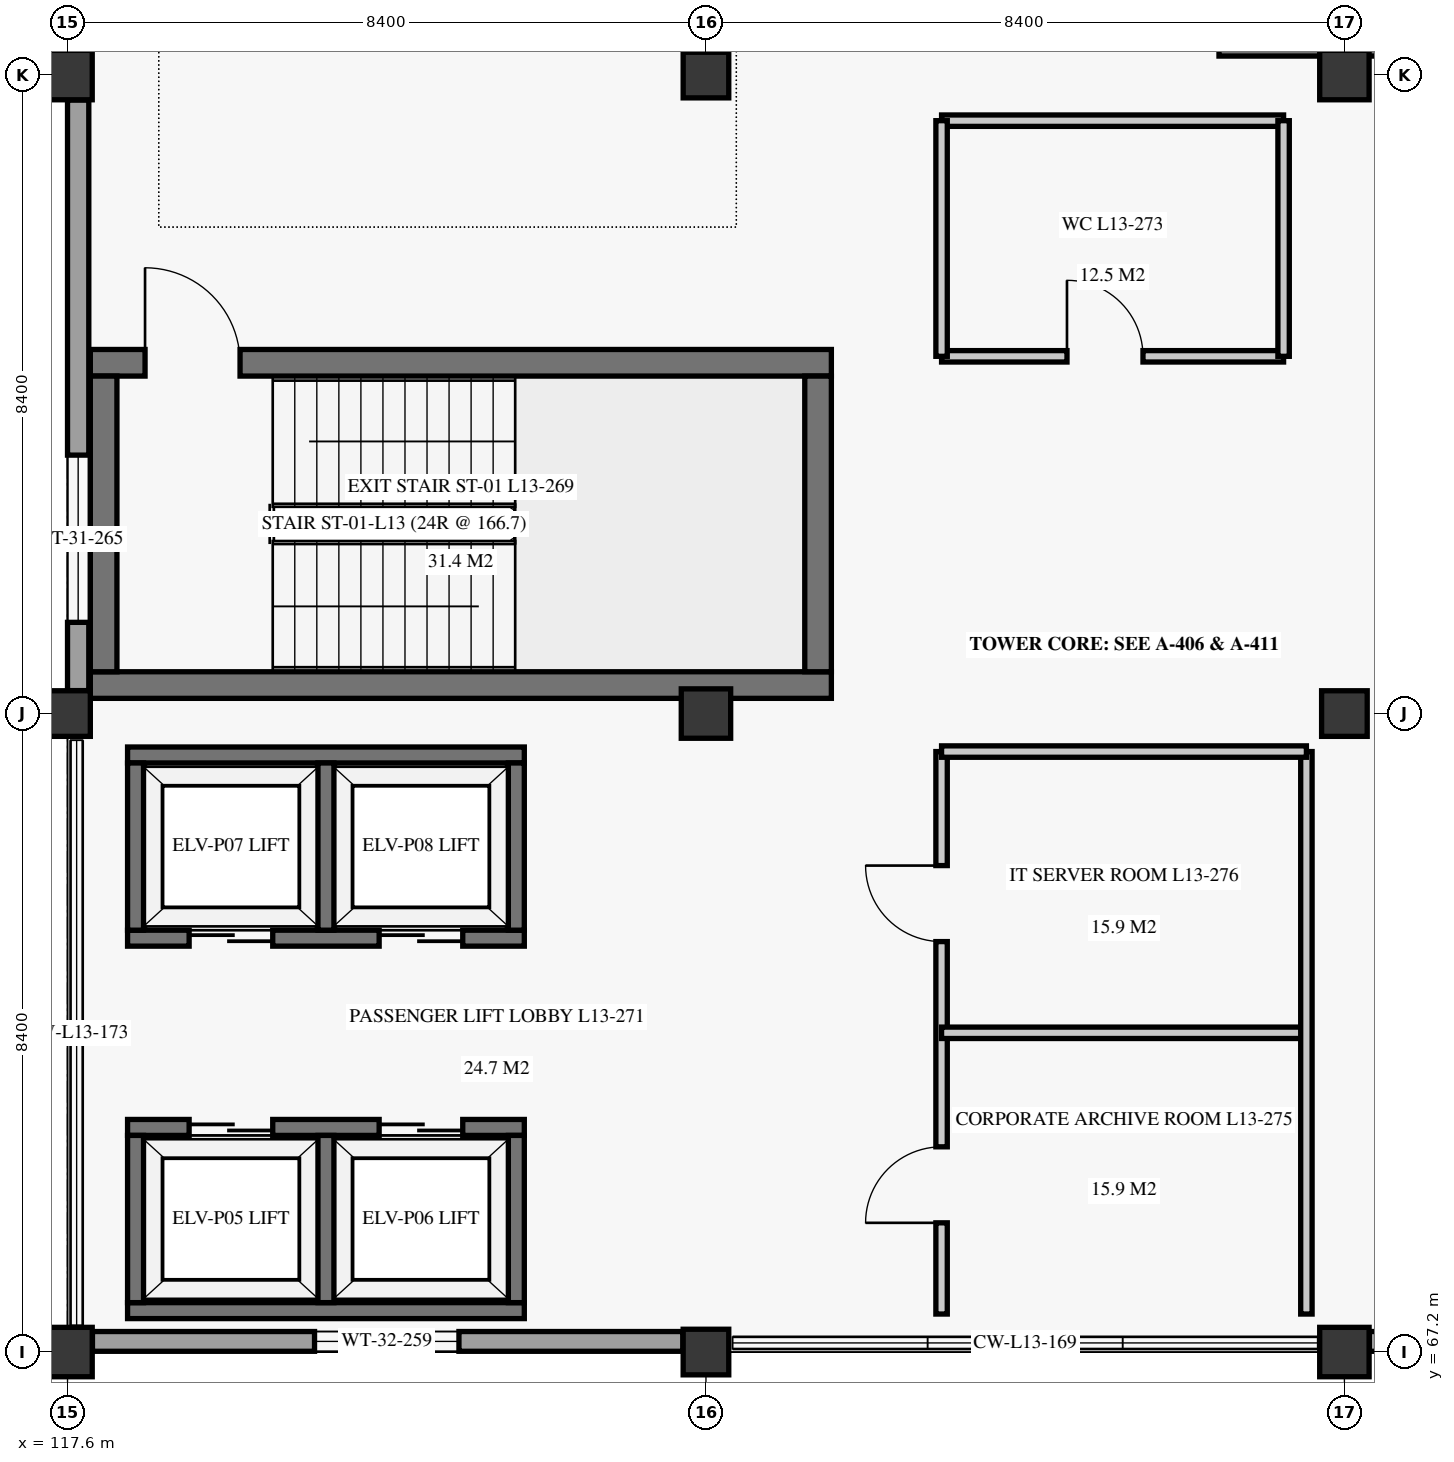
"""IFC4 building model, lengths in metres.
Left out: names, types, materials, properties, quantities, classifications, styles, units other than length and angle.
Written with IfcOpenShell. Run it as: python <this file> out.ifc"""

import sys

from ifc_helpers import new_model, si_unit, direction, frame, frame_2d, origin, origin_2d, place, context, subcontext, project, spatial, rectangle, extrude, element, fill, save


model = new_model("IFC4")
c1 = context("Model", 3, precision=1e-05, world=origin(), true_north=direction((0.0, 1.0)))
c2 = subcontext(c1, "Body", "Model", "MODEL_VIEW")
j1 = project(units=[si_unit("LENGTHUNIT", "METRE"), si_unit("PLANEANGLEUNIT", "RADIAN")], contexts=[c1])
p1 = place(None, origin())
s1 = spatial("IfcSite", under=j1, at=p1, CompositionType="ELEMENT")
p2 = place(p1, origin())
s2 = spatial("IfcBuilding", under=s1, at=p2, CompositionType="ELEMENT")
p3 = place(p2, frame((0.0, 0.0, 54.7)))
s3 = spatial("IfcBuildingStorey", under=s2, at=p3, CompositionType="ELEMENT", Elevation=54.7)
p4 = place(p3, frame((117.6, 67.2, 0.0), z_axis=(0.0, 0.0, 1.0), x_axis=(1.0, 0.0, 0.0)))
e1 = element("IfcColumn", 1, at=p4, inside=s3, PredefinedType="COLUMN", context=c2, shape_type="SweptSolid", body=[
    extrude(rectangle(XDim=0.65, YDim=0.65, at=origin_2d()), origin(), (0.0, 0.0, 1.0), 3.72),
])
p5 = place(p3, frame((117.6, 75.6, 0.0), z_axis=(0.0, 0.0, 1.0), x_axis=(1.0, 0.0, 0.0)))
e2 = element("IfcColumn", 2, at=p5, inside=s3, PredefinedType="COLUMN", context=c2, shape_type="SweptSolid", body=[
    extrude(rectangle(XDim=0.6, YDim=0.6, at=origin_2d()), origin(), (0.0, 0.0, 1.0), 3.72),
])
p6 = place(p3, frame((117.6, 84.0, 0.0), z_axis=(0.0, 0.0, 1.0), x_axis=(1.0, 0.0, 0.0)))
e3 = element("IfcColumn", 3, at=p6, inside=s3, PredefinedType="COLUMN", context=c2, shape_type="SweptSolid", body=[
    extrude(rectangle(XDim=0.65, YDim=0.65, at=origin_2d()), origin(), (0.0, 0.0, 1.0), 3.72),
])
p7 = place(p3, frame((126.0, 67.2, 0.0), z_axis=(0.0, 0.0, 1.0), x_axis=(1.0, 0.0, 0.0)))
e4 = element("IfcColumn", 4, at=p7, inside=s3, PredefinedType="COLUMN", context=c2, shape_type="SweptSolid", body=[
    extrude(rectangle(XDim=0.6, YDim=0.6, at=origin_2d()), origin(), (0.0, 0.0, 1.0), 3.72),
])
p8 = place(p3, frame((126.0, 75.6, 0.0), z_axis=(0.0, 0.0, 1.0), x_axis=(1.0, 0.0, 0.0)))
e5 = element("IfcColumn", 5, at=p8, inside=s3, PredefinedType="COLUMN", context=c2, shape_type="SweptSolid", body=[
    extrude(rectangle(XDim=0.65, YDim=0.65, at=origin_2d()), origin(), (0.0, 0.0, 1.0), 3.72),
])
p9 = place(p3, frame((126.0, 84.0, 0.0), z_axis=(0.0, 0.0, 1.0), x_axis=(1.0, 0.0, 0.0)))
e6 = element("IfcColumn", 6, at=p9, inside=s3, PredefinedType="COLUMN", context=c2, shape_type="SweptSolid", body=[
    extrude(rectangle(XDim=0.6, YDim=0.6, at=origin_2d()), origin(), (0.0, 0.0, 1.0), 3.72),
])
p10 = place(p3, frame((134.4, 67.2, 0.0), z_axis=(0.0, 0.0, 1.0), x_axis=(1.0, 0.0, 0.0)))
e7 = element("IfcColumn", 7, at=p10, inside=s3, PredefinedType="COLUMN", context=c2, shape_type="SweptSolid", body=[
    extrude(rectangle(XDim=0.65, YDim=0.65, at=origin_2d()), origin(), (0.0, 0.0, 1.0), 3.72),
])
p11 = place(p3, frame((134.4, 75.6, 0.0), z_axis=(0.0, 0.0, 1.0), x_axis=(1.0, 0.0, 0.0)))
e8 = element("IfcColumn", 8, at=p11, inside=s3, PredefinedType="COLUMN", context=c2, shape_type="SweptSolid", body=[
    extrude(rectangle(XDim=0.6, YDim=0.6, at=origin_2d()), origin(), (0.0, 0.0, 1.0), 3.72),
])
p12 = place(p3, frame((134.4, 84.0, 0.0), z_axis=(0.0, 0.0, 1.0), x_axis=(1.0, 0.0, 0.0)))
e9 = element("IfcColumn", 9, at=p12, inside=s3, PredefinedType="COLUMN", context=c2, shape_type="SweptSolid", body=[
    extrude(rectangle(XDim=0.65, YDim=0.65, at=origin_2d()), origin(), (0.0, 0.0, 1.0), 3.72),
])
p13 = place(p3, frame((117.928, 67.34, 0.0), z_axis=(0.0, 0.0, 1.0), x_axis=(1.0, 0.0, 0.0)))
e10 = element("IfcWall", 10, at=p13, inside=s3, PredefinedType="SOLIDWALL", context=c2, shape_type="SweptSolid", body=[
    extrude(rectangle(XDim=7.768, YDim=0.26, at=frame_2d((3.884, 0.0))), origin(), (0.0, 0.0, 1.0), 3.04),
])
p14 = place(p13, frame((2.922, 0.0, 0.85)))
e11 = element("IfcOpeningElement", 11, at=p14, cuts=e10, PredefinedType="OPENING", context=c2, shape_type="SweptSolid", body=[
    extrude(rectangle(XDim=1.9, YDim=1.75, at=frame_2d((0.95, 0.875))), frame((0.0, 0.14, 0.0), z_axis=(0.0, -1.0, 0.0), x_axis=(1.0, 0.0, 0.0)), (0.0, 0.0, 1.0), 0.28),
])
p15 = place(p3, frame((134.728, 67.34, 0.0), z_axis=(0.0, 0.0, 1.0), x_axis=(1.0, 0.0, 0.0)))
e12 = element("IfcWall", 12, at=p15, inside=s3, PredefinedType="SOLIDWALL", context=c2, shape_type="SweptSolid", body=[
    extrude(rectangle(XDim=7.77, YDim=0.26, at=frame_2d((3.885, 0.0))), origin(), (0.0, 0.0, 1.0), 3.04),
])
p16 = place(p15, frame((2.322, 0.0, 0.85)))
e13 = element("IfcOpeningElement", 13, at=p16, cuts=e12, PredefinedType="OPENING", context=c2, shape_type="SweptSolid", body=[
    extrude(rectangle(XDim=3.1, YDim=1.85, at=frame_2d((1.55, 0.925))), frame((0.0, 0.14, 0.0), z_axis=(0.0, -1.0, 0.0), x_axis=(1.0, 0.0, 0.0)), (0.0, 0.0, 1.0), 0.28),
])
p17 = place(p3, frame((117.74, 75.902, 0.0), z_axis=(0.0, 0.0, 1.0), x_axis=(0.0, 1.0, 0.0)))
e14 = element("IfcWall", 14, at=p17, inside=s3, PredefinedType="SOLIDWALL", context=c2, shape_type="SweptSolid", body=[
    extrude(rectangle(XDim=7.77, YDim=0.28, at=frame_2d((3.885, 0.0))), origin(), (0.0, 0.0, 1.0), 3.04),
])
p18 = place(p17, frame((0.898, 0.0, 0.85)))
e15 = element("IfcOpeningElement", 15, at=p18, cuts=e14, PredefinedType="OPENING", context=c2, shape_type="SweptSolid", body=[
    extrude(rectangle(XDim=2.2, YDim=1.8, at=frame_2d((1.1, 0.9))), frame((0.0, 0.15, 0.0), z_axis=(0.0, -1.0, 0.0), x_axis=(1.0, 0.0, 0.0)), (0.0, 0.0, 1.0), 0.3),
])
p19 = place(p3, frame((117.9, 75.975, 0.0), z_axis=(0.0, 0.0, 1.0), x_axis=(1.0, 0.0, 0.0)))
e16 = element("IfcWall", 16, at=p19, inside=s3, PredefinedType="SHEAR", context=c2, shape_type="SweptSolid", body=[
    extrude(rectangle(XDim=9.75, YDim=0.35, at=frame_2d((4.875, 0.0))), origin(), (0.0, 0.0, 1.0), 3.72),
])
p20 = place(p3, frame((117.9, 80.215, 0.0), z_axis=(0.0, 0.0, 1.0), x_axis=(1.0, 0.0, 0.0)))
e17 = element("IfcWall", 17, at=p20, inside=s3, PredefinedType="SHEAR", context=c2, shape_type="SweptSolid", body=[
    extrude(rectangle(XDim=9.75, YDim=0.35, at=frame_2d((4.875, 0.0))), origin(), (0.0, 0.0, 1.0), 3.72),
])
p21 = place(p20, frame((0.72, 0.0, 0.0)))
e18 = element("IfcOpeningElement", 18, at=p21, cuts=e17, PredefinedType="OPENING", context=c2, shape_type="SweptSolid", body=[
    extrude(rectangle(XDim=1.25, YDim=2.2, at=frame_2d((0.625, 1.1))), frame((0.0, 0.185, 0.0), z_axis=(0.0, -1.0, 0.0), x_axis=(1.0, 0.0, 0.0)), (0.0, 0.0, 1.0), 0.37),
])
for number, where, z_axis, x_axis in (
    (19, (118.075, 76.15, 0.0), (0.0, 0.0, 1.0), (0.0, 1.0, 0.0)),
    (20, (127.475, 76.15, 0.0), (0.0, 0.0, 1.0), (0.0, 1.0, 0.0)),
):
    element("IfcWall", number, at=place(p3, frame(where, z_axis=z_axis, x_axis=x_axis)), inside=s3, PredefinedType="SHEAR", context=c2, shape_type="SweptSolid", body=[
        extrude(rectangle(XDim=3.89, YDim=0.35, at=frame_2d((1.945, 0.0))), origin(), (0.0, 0.0, 1.0), 3.72),
    ])
p22 = place(p3, frame((132.75, 84.425, 0.0), z_axis=(0.0, 0.0, 1.0), x_axis=(1.0, 0.0, 0.0)))
e21 = element("IfcWall", 21, at=p22, inside=s3, PredefinedType="SHEAR", context=c2, shape_type="SweptSolid", body=[
    extrude(rectangle(XDim=9.75, YDim=0.35, at=frame_2d((4.875, 0.0))), origin(), (0.0, 0.0, 1.0), 3.72),
])
p23 = place(p3, frame((118.39, 67.745, 0.0), z_axis=(0.0, 0.0, 1.0), x_axis=(1.0, 0.0, 0.0)))
e22 = element("IfcWall", 22, at=p23, inside=s3, PredefinedType="SHEAR", context=c2, shape_type="SweptSolid", body=[
    extrude(rectangle(XDim=5.22, YDim=0.21, at=frame_2d((2.61, 0.0))), origin(), (0.0, 0.0, 1.0), 3.72),
])
p24 = place(p3, frame((118.39, 70.155, 0.0), z_axis=(0.0, 0.0, 1.0), x_axis=(1.0, 0.0, 0.0)))
e23 = element("IfcWall", 23, at=p24, inside=s3, PredefinedType="SHEAR", context=c2, shape_type="SweptSolid", body=[
    extrude(rectangle(XDim=5.22, YDim=0.21, at=frame_2d((2.61, 0.0))), origin(), (0.0, 0.0, 1.0), 3.72),
])
p25 = place(p24, frame((0.81, 0.0, 0.0)))
e24 = element("IfcOpeningElement", 24, at=p25, cuts=e23, PredefinedType="OPENING", context=c2, shape_type="SweptSolid", body=[
    extrude(rectangle(XDim=1.1, YDim=2.15, at=frame_2d((0.55, 1.075))), frame((0.0, 0.115, 0.0), z_axis=(0.0, -1.0, 0.0), x_axis=(1.0, 0.0, 0.0)), (0.0, 0.0, 1.0), 0.23),
])
p26 = place(p24, frame((3.31, 0.0, 0.0)))
e25 = element("IfcOpeningElement", 25, at=p26, cuts=e23, PredefinedType="OPENING", context=c2, shape_type="SweptSolid", body=[
    extrude(rectangle(XDim=1.1, YDim=2.15, at=frame_2d((0.55, 1.075))), frame((0.0, 0.115, 0.0), z_axis=(0.0, -1.0, 0.0), x_axis=(1.0, 0.0, 0.0)), (0.0, 0.0, 1.0), 0.23),
])
for number, where, z_axis, x_axis in (
    (26, (118.495, 67.85, 0.0), (0.0, 0.0, 1.0), (0.0, 1.0, 0.0)),
    (27, (123.505, 67.85, 0.0), (0.0, 0.0, 1.0), (0.0, 1.0, 0.0)),
    (28, (121.0, 67.85, 0.0), (0.0, 0.0, 1.0), (0.0, 1.0, 0.0)),
):
    element("IfcWall", number, at=place(p3, frame(where, z_axis=z_axis, x_axis=x_axis)), inside=s3, PredefinedType="SHEAR", context=c2, shape_type="SweptSolid", body=[
        extrude(rectangle(XDim=2.2, YDim=0.21, at=frame_2d((1.1, 0.0))), origin(), (0.0, 0.0, 1.0), 3.72),
    ])
p27 = place(p3, frame((118.39, 72.645, 0.0), z_axis=(0.0, 0.0, 1.0), x_axis=(1.0, 0.0, 0.0)))
e29 = element("IfcWall", 29, at=p27, inside=s3, PredefinedType="SHEAR", context=c2, shape_type="SweptSolid", body=[
    extrude(rectangle(XDim=5.22, YDim=0.21, at=frame_2d((2.61, 0.0))), origin(), (0.0, 0.0, 1.0), 3.72),
])
p28 = place(p27, frame((0.81, 0.0, 0.0)))
e30 = element("IfcOpeningElement", 30, at=p28, cuts=e29, PredefinedType="OPENING", context=c2, shape_type="SweptSolid", body=[
    extrude(rectangle(XDim=1.1, YDim=2.15, at=frame_2d((0.55, 1.075))), frame((0.0, 0.115, 0.0), z_axis=(0.0, -1.0, 0.0), x_axis=(1.0, 0.0, 0.0)), (0.0, 0.0, 1.0), 0.23),
])
p29 = place(p27, frame((3.31, 0.0, 0.0)))
e31 = element("IfcOpeningElement", 31, at=p29, cuts=e29, PredefinedType="OPENING", context=c2, shape_type="SweptSolid", body=[
    extrude(rectangle(XDim=1.1, YDim=2.15, at=frame_2d((0.55, 1.075))), frame((0.0, 0.115, 0.0), z_axis=(0.0, -1.0, 0.0), x_axis=(1.0, 0.0, 0.0)), (0.0, 0.0, 1.0), 0.23),
])
p30 = place(p3, frame((118.39, 75.055, 0.0), z_axis=(0.0, 0.0, 1.0), x_axis=(1.0, 0.0, 0.0)))
e32 = element("IfcWall", 32, at=p30, inside=s3, PredefinedType="SHEAR", context=c2, shape_type="SweptSolid", body=[
    extrude(rectangle(XDim=5.22, YDim=0.21, at=frame_2d((2.61, 0.0))), origin(), (0.0, 0.0, 1.0), 3.72),
])
for number, where, z_axis, x_axis in (
    (33, (118.495, 72.75, 0.0), (0.0, 0.0, 1.0), (0.0, 1.0, 0.0)),
    (34, (123.505, 72.75, 0.0), (0.0, 0.0, 1.0), (0.0, 1.0, 0.0)),
    (35, (121.0, 72.75, 0.0), (0.0, 0.0, 1.0), (0.0, 1.0, 0.0)),
):
    element("IfcWall", number, at=place(p3, frame(where, z_axis=z_axis, x_axis=x_axis)), inside=s3, PredefinedType="SHEAR", context=c2, shape_type="SweptSolid", body=[
        extrude(rectangle(XDim=2.2, YDim=0.21, at=frame_2d((1.1, 0.0))), origin(), (0.0, 0.0, 1.0), 3.72),
    ])
p31 = place(p3, frame((129.1, 80.3, 0.0), z_axis=(0.0, 0.0, 1.0), x_axis=(1.0, 0.0, 0.0)))
e36 = element("IfcWall", 36, at=p31, inside=s3, PredefinedType="PARTITIONING", context=c2, shape_type="SweptSolid", body=[
    extrude(rectangle(XDim=4.5, YDim=0.15, at=frame_2d((2.25, 0.0))), origin(), (0.0, 0.0, 1.0), 3.34),
])
p32 = place(p31, frame((1.65, 0.0, 0.0)))
e37 = element("IfcOpeningElement", 37, at=p32, cuts=e36, PredefinedType="OPENING", context=c2, shape_type="SweptSolid", body=[
    extrude(rectangle(XDim=1.0, YDim=2.1, at=frame_2d((0.5, 1.05))), frame((0.0, 0.085, 0.0), z_axis=(0.0, -1.0, 0.0), x_axis=(1.0, 0.0, 0.0)), (0.0, 0.0, 1.0), 0.17),
])
p33 = place(p3, frame((129.1, 83.4, 0.0), z_axis=(0.0, 0.0, 1.0), x_axis=(1.0, 0.0, 0.0)))
e38 = element("IfcWall", 38, at=p33, inside=s3, PredefinedType="PARTITIONING", context=c2, shape_type="SweptSolid", body=[
    extrude(rectangle(XDim=4.5, YDim=0.15, at=frame_2d((2.25, 0.0))), origin(), (0.0, 0.0, 1.0), 3.34),
])
for number, where, z_axis, x_axis in (
    (39, (129.1, 80.3, 0.0), (0.0, 0.0, 1.0), (0.0, 1.0, 0.0)),
    (40, (133.6, 80.3, 0.0), (0.0, 0.0, 1.0), (0.0, 1.0, 0.0)),
):
    element("IfcWall", number, at=place(p3, frame(where, z_axis=z_axis, x_axis=x_axis)), inside=s3, PredefinedType="PARTITIONING", context=c2, shape_type="SweptSolid", body=[
        extrude(rectangle(XDim=3.1, YDim=0.15, at=frame_2d((1.55, 0.0))), origin(), (0.0, 0.0, 1.0), 3.34),
    ])
p34 = place(p3, frame((129.1, 67.7, 0.0), z_axis=(0.0, 0.0, 1.0), x_axis=(0.0, 1.0, 0.0)))
e41 = element("IfcWall", 41, at=p34, inside=s3, PredefinedType="PARTITIONING", context=c2, shape_type="SweptSolid", body=[
    extrude(rectangle(XDim=7.4, YDim=0.15, at=frame_2d((3.7, 0.0))), origin(), (0.0, 0.0, 1.0), 3.34),
])
p35 = place(p34, frame((1.2, 0.0, 0.0)))
e42 = element("IfcOpeningElement", 42, at=p35, cuts=e41, PredefinedType="OPENING", context=c2, shape_type="SweptSolid", body=[
    extrude(rectangle(XDim=1.0, YDim=2.1, at=frame_2d((0.5, 1.05))), frame((0.0, 0.085, 0.0), z_axis=(0.0, -1.0, 0.0), x_axis=(1.0, 0.0, 0.0)), (0.0, 0.0, 1.0), 0.17),
])
p36 = place(p34, frame((4.9, 0.0, 0.0)))
e43 = element("IfcOpeningElement", 43, at=p36, cuts=e41, PredefinedType="OPENING", context=c2, shape_type="SweptSolid", body=[
    extrude(rectangle(XDim=1.0, YDim=2.1, at=frame_2d((0.5, 1.05))), frame((0.0, 0.085, 0.0), z_axis=(0.0, -1.0, 0.0), x_axis=(1.0, 0.0, 0.0)), (0.0, 0.0, 1.0), 0.17),
])
p37 = place(p3, frame((129.1, 71.4, 0.0), z_axis=(0.0, 0.0, 1.0), x_axis=(1.0, 0.0, 0.0)))
e44 = element("IfcWall", 44, at=p37, inside=s3, PredefinedType="PARTITIONING", context=c2, shape_type="SweptSolid", body=[
    extrude(rectangle(XDim=4.8, YDim=0.15, at=frame_2d((2.4, 0.0))), origin(), (0.0, 0.0, 1.0), 3.34),
])
p38 = place(p3, frame((133.9, 67.7, 0.0), z_axis=(0.0, 0.0, 1.0), x_axis=(0.0, 1.0, 0.0)))
e45 = element("IfcWall", 45, at=p38, inside=s3, PredefinedType="PARTITIONING", context=c2, shape_type="SweptSolid", body=[
    extrude(rectangle(XDim=7.4, YDim=0.15, at=frame_2d((3.7, 0.0))), origin(), (0.0, 0.0, 1.0), 3.34),
])
p39 = place(p3, frame((129.1, 75.1, 0.0), z_axis=(0.0, 0.0, 1.0), x_axis=(1.0, 0.0, 0.0)))
e46 = element("IfcWall", 46, at=p39, inside=s3, PredefinedType="PARTITIONING", context=c2, shape_type="SweptSolid", body=[
    extrude(rectangle(XDim=4.8, YDim=0.15, at=frame_2d((2.4, 0.0))), origin(), (0.0, 0.0, 1.0), 3.34),
])
p40 = place(p14, origin())
e47 = element("IfcWindow", 47, at=p40, inside=s3, PartitioningType="SINGLE_PANEL", PredefinedType="WINDOW", context=c2, shape_type="SweptSolid", body=[
    extrude(rectangle(XDim=1.9, YDim=1.75, at=frame_2d((0.95, 0.875))), frame((0.0, 0.03, 0.0), z_axis=(0.0, -1.0, 0.0), x_axis=(1.0, 0.0, 0.0)), (0.0, 0.0, 1.0), 0.06),
])
fill(e11, e47)
p41 = place(p18, origin())
e48 = element("IfcWindow", 48, at=p41, inside=s3, PartitioningType="SINGLE_PANEL", PredefinedType="WINDOW", context=c2, shape_type="SweptSolid", body=[
    extrude(rectangle(XDim=2.2, YDim=1.8, at=frame_2d((1.1, 0.9))), frame((0.0, 0.03, 0.0), z_axis=(0.0, -1.0, 0.0), x_axis=(1.0, 0.0, 0.0)), (0.0, 0.0, 1.0), 0.06),
])
fill(e15, e48)
p42 = place(p21, origin())
e49 = element("IfcDoor", 49, at=p42, inside=s3, OperationType="SINGLE_SWING_LEFT", PredefinedType="DOOR", context=c2, shape_type="SweptSolid", body=[
    extrude(rectangle(XDim=1.25, YDim=2.2, at=frame_2d((0.625, 1.1))), frame((0.0, 0.025, 0.0), z_axis=(0.0, -1.0, 0.0), x_axis=(1.0, 0.0, 0.0)), (0.0, 0.0, 1.0), 0.05),
])
fill(e18, e49)
p43 = place(p25, origin())
e50 = element("IfcDoor", 50, at=p43, inside=s3, OperationType="DOUBLE_DOOR_SLIDING", PredefinedType="DOOR", context=c2, shape_type="SweptSolid", body=[
    extrude(rectangle(XDim=1.1, YDim=2.15, at=frame_2d((0.55, 1.075))), frame((0.0, 0.025, 0.0), z_axis=(0.0, -1.0, 0.0), x_axis=(1.0, 0.0, 0.0)), (0.0, 0.0, 1.0), 0.05),
])
fill(e24, e50)
p44 = place(p26, origin())
e51 = element("IfcDoor", 51, at=p44, inside=s3, OperationType="DOUBLE_DOOR_SLIDING", PredefinedType="DOOR", context=c2, shape_type="SweptSolid", body=[
    extrude(rectangle(XDim=1.1, YDim=2.15, at=frame_2d((0.55, 1.075))), frame((0.0, 0.025, 0.0), z_axis=(0.0, -1.0, 0.0), x_axis=(1.0, 0.0, 0.0)), (0.0, 0.0, 1.0), 0.05),
])
fill(e25, e51)
p45 = place(p28, origin())
e52 = element("IfcDoor", 52, at=p45, inside=s3, OperationType="DOUBLE_DOOR_SLIDING", PredefinedType="DOOR", context=c2, shape_type="SweptSolid", body=[
    extrude(rectangle(XDim=1.1, YDim=2.15, at=frame_2d((0.55, 1.075))), frame((0.0, 0.025, 0.0), z_axis=(0.0, -1.0, 0.0), x_axis=(1.0, 0.0, 0.0)), (0.0, 0.0, 1.0), 0.05),
])
fill(e30, e52)
p46 = place(p29, origin())
e53 = element("IfcDoor", 53, at=p46, inside=s3, OperationType="DOUBLE_DOOR_SLIDING", PredefinedType="DOOR", context=c2, shape_type="SweptSolid", body=[
    extrude(rectangle(XDim=1.1, YDim=2.15, at=frame_2d((0.55, 1.075))), frame((0.0, 0.025, 0.0), z_axis=(0.0, -1.0, 0.0), x_axis=(1.0, 0.0, 0.0)), (0.0, 0.0, 1.0), 0.05),
])
fill(e31, e53)
p47 = place(p32, origin())
e54 = element("IfcDoor", 54, at=p47, inside=s3, OperationType="SINGLE_SWING_LEFT", PredefinedType="DOOR", context=c2, shape_type="SweptSolid", body=[
    extrude(rectangle(XDim=1.0, YDim=2.1, at=frame_2d((0.5, 1.05))), frame((0.0, 0.025, 0.0), z_axis=(0.0, -1.0, 0.0), x_axis=(1.0, 0.0, 0.0)), (0.0, 0.0, 1.0), 0.05),
])
fill(e37, e54)
p48 = place(p35, origin())
e55 = element("IfcDoor", 55, at=p48, inside=s3, OperationType="SINGLE_SWING_LEFT", PredefinedType="DOOR", context=c2, shape_type="SweptSolid", body=[
    extrude(rectangle(XDim=1.0, YDim=2.1, at=frame_2d((0.5, 1.05))), frame((0.0, 0.025, 0.0), z_axis=(0.0, -1.0, 0.0), x_axis=(1.0, 0.0, 0.0)), (0.0, 0.0, 1.0), 0.05),
])
fill(e42, e55)
p49 = place(p36, origin())
e56 = element("IfcDoor", 56, at=p49, inside=s3, OperationType="SINGLE_SWING_RIGHT", PredefinedType="DOOR", context=c2, shape_type="SweptSolid", body=[
    extrude(rectangle(XDim=1.0, YDim=2.1, at=frame_2d((0.5, 1.05))), frame((0.0, 0.025, 0.0), z_axis=(0.0, -1.0, 0.0), x_axis=(1.0, 0.0, 0.0)), (0.0, 0.0, 1.0), 0.05),
])
fill(e43, e56)
save(model, sys.argv[1])
